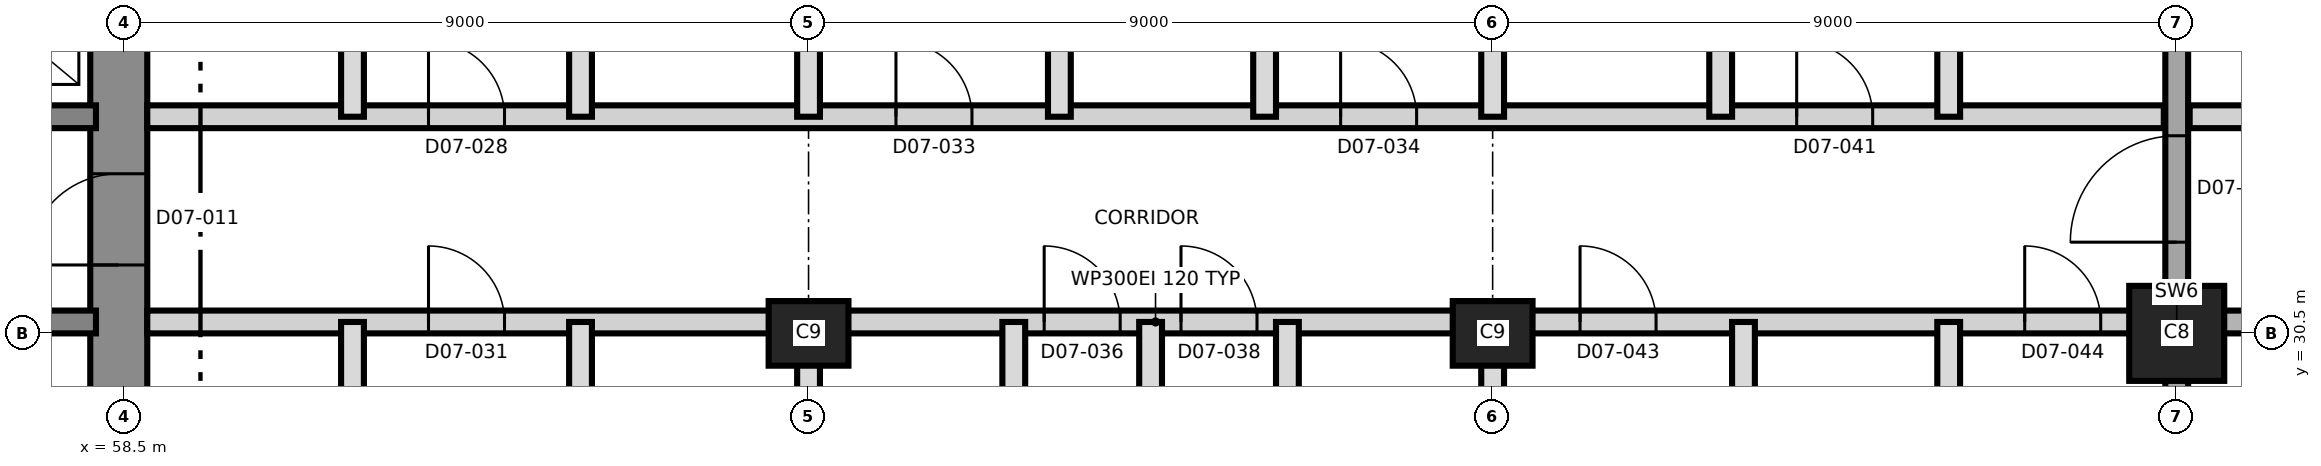
"""IFC4 building model, lengths in metres.
Left out: names, types, materials, properties, quantities, classifications, styles, units other than length and angle.
Written with IfcOpenShell. Run it as: python <this file> out.ifc"""

import sys

from ifc_helpers import new_model, si_unit, direction, frame, frame_2d, origin, origin_2d, place, context, subcontext, project, spatial, rectangle, extrude, element, fill, save


model = new_model("IFC4")
c1 = context("Model", 3, precision=1e-05, world=origin(), true_north=direction((0.0, 1.0)))
c2 = subcontext(c1, "Body", "Model", "MODEL_VIEW")
j1 = project(units=[si_unit("LENGTHUNIT", "METRE"), si_unit("PLANEANGLEUNIT", "RADIAN")], contexts=[c1])
p1 = place(None, origin())
s1 = spatial("IfcSite", under=j1, at=p1, CompositionType="ELEMENT")
p2 = place(p1, origin())
s2 = spatial("IfcBuilding", under=s1, at=p2, CompositionType="ELEMENT")
p3 = place(p2, frame((0.0, 0.0, 87.1)))
s3 = spatial("IfcBuildingStorey", under=s2, at=p3, CompositionType="ELEMENT", Elevation=87.1)
p4 = place(p3, frame((58.425, 21.125, 0.0), z_axis=(0.0, 0.0, 1.0), x_axis=(0.0, 1.0, 0.0)))
e1 = element("IfcWall", 1, at=p4, inside=s3, PredefinedType="SHEAR", context=c2, shape_type="SweptSolid", body=[
    extrude(rectangle(XDim=18.75, YDim=0.75, at=frame_2d((9.375, 0.0))), origin(), (0.0, 0.0, 1.0), 3.7),
])
p5 = place(p4, frame((10.275, 0.0, 0.0)))
e2 = element("IfcOpeningElement", 2, at=p5, cuts=e1, PredefinedType="OPENING", context=c2, shape_type="SweptSolid", body=[
    extrude(rectangle(XDim=1.2, YDim=2.1, at=frame_2d((0.6, 1.05))), frame((0.0, 0.385, 0.0), z_axis=(0.0, -1.0, 0.0), x_axis=(1.0, 0.0, 0.0)), (0.0, 0.0, 1.0), 0.77),
])
p6 = place(p3, frame((31.875, 30.65, 0.0), z_axis=(0.0, 0.0, 1.0), x_axis=(1.0, 0.0, 0.0)))
e3 = element("IfcWall", 3, at=p6, inside=s3, PredefinedType="SHEAR", context=c2, shape_type="SweptSolid", body=[
    extrude(rectangle(XDim=26.25, YDim=0.3, at=frame_2d((13.125, 0.0))), origin(), (0.0, 0.0, 1.0), 3.7),
])
p7 = place(p6, frame((24.625, 0.0, 0.0)))
e4 = element("IfcOpeningElement", 4, at=p7, cuts=e3, PredefinedType="OPENING", context=c2, shape_type="SweptSolid", body=[
    extrude(rectangle(XDim=1.0, YDim=2.1, at=frame_2d((0.5, 1.05))), frame((0.0, 0.16, 0.0), z_axis=(0.0, -1.0, 0.0), x_axis=(1.0, 0.0, 0.0)), (0.0, 0.0, 1.0), 0.32),
])
p8 = place(p6, frame((11.425, 0.0, 0.0)))
e5 = element("IfcOpeningElement", 5, at=p8, cuts=e3, PredefinedType="OPENING", context=c2, shape_type="SweptSolid", body=[
    extrude(rectangle(XDim=1.0, YDim=2.1, at=frame_2d((0.5, 1.05))), frame((0.0, 0.16, 0.0), z_axis=(0.0, -1.0, 0.0), x_axis=(1.0, 0.0, 0.0)), (0.0, 0.0, 1.0), 0.32),
])
p9 = place(p3, frame((31.875, 33.35, 0.0), z_axis=(0.0, 0.0, 1.0), x_axis=(1.0, 0.0, 0.0)))
e6 = element("IfcWall", 6, at=p9, inside=s3, PredefinedType="SHEAR", context=c2, shape_type="SweptSolid", body=[
    extrude(rectangle(XDim=26.25, YDim=0.3, at=frame_2d((13.125, 0.0))), origin(), (0.0, 0.0, 1.0), 3.7),
])
p10 = place(p9, frame((13.775, 0.0, 0.0)))
e7 = element("IfcOpeningElement", 7, at=p10, cuts=e6, PredefinedType="OPENING", context=c2, shape_type="SweptSolid", body=[
    extrude(rectangle(XDim=1.4, YDim=2.1, at=frame_2d((0.7, 1.05))), frame((0.0, 0.16, 0.0), z_axis=(0.0, -1.0, 0.0), x_axis=(1.0, 0.0, 0.0)), (0.0, 0.0, 1.0), 0.32),
])
p11 = place(p9, frame((5.25, 0.0, 0.0)))
e8 = element("IfcOpeningElement", 8, at=p11, cuts=e6, PredefinedType="OPENING", context=c2, shape_type="SweptSolid", body=[
    extrude(rectangle(XDim=1.2, YDim=2.1, at=frame_2d((0.6, 1.05))), frame((0.0, 0.16, 0.0), z_axis=(0.0, -1.0, 0.0), x_axis=(1.0, 0.0, 0.0)), (0.0, 0.0, 1.0), 0.32),
])
p12 = place(p9, frame((19.8, 0.0, 0.0)))
e9 = element("IfcOpeningElement", 9, at=p12, cuts=e6, PredefinedType="OPENING", context=c2, shape_type="SweptSolid", body=[
    extrude(rectangle(XDim=1.2, YDim=2.1, at=frame_2d((0.6, 1.05))), frame((0.0, 0.16, 0.0), z_axis=(0.0, -1.0, 0.0), x_axis=(1.0, 0.0, 0.0)), (0.0, 0.0, 1.0), 0.32),
])
for number, where, z_axis, x_axis in (
    (10, (67.5, 30.5, 0.0), (0.0, 0.0, 1.0), (1.0, 0.0, 0.0)),
    (11, (76.5, 30.5, 0.0), (0.0, 0.0, 1.0), (1.0, 0.0, 0.0)),
):
    element("IfcColumn", number, at=place(p3, frame(where, z_axis=z_axis, x_axis=x_axis)), inside=s3, PredefinedType="COLUMN", context=c2, shape_type="SweptSolid", body=[
        extrude(rectangle(XDim=1.05, YDim=0.85, at=origin_2d()), origin(), (0.0, 0.0, 1.0), 3.7),
    ])
p13 = place(p3, frame((85.5, 30.5, 0.0), z_axis=(0.0, 0.0, 1.0), x_axis=(1.0, 0.0, 0.0)))
e12 = element("IfcColumn", 12, at=p13, inside=s3, PredefinedType="COLUMN", context=c2, shape_type="SweptSolid", body=[
    extrude(rectangle(XDim=1.25, YDim=1.25, at=origin_2d()), origin(), (0.0, 0.0, 1.0), 3.7),
])
p14 = place(p3, frame((85.5, 20.995, 0.0), z_axis=(0.0, 0.0, 1.0), x_axis=(0.0, 1.0, 0.0)))
e13 = element("IfcWall", 13, at=p14, inside=s3, PredefinedType="SHEAR", context=c2, shape_type="SweptSolid", body=[
    extrude(rectangle(XDim=19.01, YDim=0.3, at=frame_2d((9.505, 0.0))), origin(), (0.0, 0.0, 1.0), 3.7),
])
p15 = place(p14, frame((10.705, 0.0, 0.0)))
e14 = element("IfcOpeningElement", 14, at=p15, cuts=e13, PredefinedType="OPENING", context=c2, shape_type="SweptSolid", body=[
    extrude(rectangle(XDim=1.4, YDim=2.1, at=frame_2d((0.7, 1.05))), frame((0.0, 0.16, 0.0), z_axis=(0.0, -1.0, 0.0), x_axis=(1.0, 0.0, 0.0)), (0.0, 0.0, 1.0), 0.32),
])
p16 = place(p3, frame((58.8, 30.65, 0.0), z_axis=(0.0, 0.0, 1.0), x_axis=(1.0, 0.0, 0.0)))
e15 = element("IfcWall", 15, at=p16, inside=s3, PredefinedType="PARTITIONING", context=c2, shape_type="SweptSolid", body=[
    extrude(rectangle(XDim=26.53, YDim=0.3, at=frame_2d((13.265, 0.0))), origin(), (0.0, 0.0, 1.0), 3.4),
])
p17 = place(p16, frame((3.7, 0.0, 0.0)))
e16 = element("IfcOpeningElement", 16, at=p17, cuts=e15, PredefinedType="OPENING", context=c2, shape_type="SweptSolid", body=[
    extrude(rectangle(XDim=1.0, YDim=2.4, at=frame_2d((0.5, 1.2))), frame((0.0, 0.16, 0.0), z_axis=(0.0, -1.0, 0.0), x_axis=(1.0, 0.0, 0.0)), (0.0, 0.0, 1.0), 0.32),
])
p18 = place(p16, frame((11.8, 0.0, 0.0)))
e17 = element("IfcOpeningElement", 17, at=p18, cuts=e15, PredefinedType="OPENING", context=c2, shape_type="SweptSolid", body=[
    extrude(rectangle(XDim=1.0, YDim=2.1, at=frame_2d((0.5, 1.05))), frame((0.0, 0.16, 0.0), z_axis=(0.0, -1.0, 0.0), x_axis=(1.0, 0.0, 0.0)), (0.0, 0.0, 1.0), 0.32),
])
p19 = place(p16, frame((13.6, 0.0, 0.0)))
e18 = element("IfcOpeningElement", 18, at=p19, cuts=e15, PredefinedType="OPENING", context=c2, shape_type="SweptSolid", body=[
    extrude(rectangle(XDim=1.0, YDim=2.1, at=frame_2d((0.5, 1.05))), frame((0.0, 0.16, 0.0), z_axis=(0.0, -1.0, 0.0), x_axis=(1.0, 0.0, 0.0)), (0.0, 0.0, 1.0), 0.32),
])
p20 = place(p16, frame((18.85, 0.0, 0.0)))
e19 = element("IfcOpeningElement", 19, at=p20, cuts=e15, PredefinedType="OPENING", context=c2, shape_type="SweptSolid", body=[
    extrude(rectangle(XDim=1.0, YDim=2.1, at=frame_2d((0.5, 1.05))), frame((0.0, 0.16, 0.0), z_axis=(0.0, -1.0, 0.0), x_axis=(1.0, 0.0, 0.0)), (0.0, 0.0, 1.0), 0.32),
])
p21 = place(p16, frame((24.7, 0.0, 0.0)))
e20 = element("IfcOpeningElement", 20, at=p21, cuts=e15, PredefinedType="OPENING", context=c2, shape_type="SweptSolid", body=[
    extrude(rectangle(XDim=1.0, YDim=2.1, at=frame_2d((0.5, 1.05))), frame((0.0, 0.16, 0.0), z_axis=(0.0, -1.0, 0.0), x_axis=(1.0, 0.0, 0.0)), (0.0, 0.0, 1.0), 0.32),
])
p22 = place(p3, frame((85.67, 30.65, 0.0), z_axis=(0.0, 0.0, 1.0), x_axis=(1.0, 0.0, 0.0)))
e21 = element("IfcWall", 21, at=p22, inside=s3, PredefinedType="SHEAR", context=c2, shape_type="SweptSolid", body=[
    extrude(rectangle(XDim=9.335, YDim=0.3, at=frame_2d((4.667, 0.0))), origin(), (0.0, 0.0, 1.0), 3.4),
])
p23 = place(p22, frame((2.08, 0.0, 0.0)))
e22 = element("IfcOpeningElement", 22, at=p23, cuts=e21, PredefinedType="OPENING", context=c2, shape_type="SweptSolid", body=[
    extrude(rectangle(XDim=1.2, YDim=2.1, at=frame_2d((0.6, 1.05))), frame((0.0, 0.16, 0.0), z_axis=(0.0, -1.0, 0.0), x_axis=(1.0, 0.0, 0.0)), (0.0, 0.0, 1.0), 0.32),
])
p24 = place(p22, frame((5.63, 0.0, 0.0)))
e23 = element("IfcOpeningElement", 23, at=p24, cuts=e21, PredefinedType="OPENING", context=c2, shape_type="SweptSolid", body=[
    extrude(rectangle(XDim=1.0, YDim=2.1, at=frame_2d((0.5, 1.05))), frame((0.0, 0.16, 0.0), z_axis=(0.0, -1.0, 0.0), x_axis=(1.0, 0.0, 0.0)), (0.0, 0.0, 1.0), 0.32),
])
p25 = place(p3, frame((58.8, 33.35, 0.0), z_axis=(0.0, 0.0, 1.0), x_axis=(1.0, 0.0, 0.0)))
e24 = element("IfcWall", 24, at=p25, inside=s3, PredefinedType="PARTITIONING", context=c2, shape_type="SweptSolid", body=[
    extrude(rectangle(XDim=26.53, YDim=0.3, at=frame_2d((13.265, 0.0))), origin(), (0.0, 0.0, 1.0), 3.4),
])
p26 = place(p25, frame((3.7, 0.0, 0.0)))
e25 = element("IfcOpeningElement", 25, at=p26, cuts=e24, PredefinedType="OPENING", context=c2, shape_type="SweptSolid", body=[
    extrude(rectangle(XDim=1.0, YDim=2.4, at=frame_2d((0.5, 1.2))), frame((0.0, 0.16, 0.0), z_axis=(0.0, -1.0, 0.0), x_axis=(1.0, 0.0, 0.0)), (0.0, 0.0, 1.0), 0.32),
])
p27 = place(p25, frame((9.85, 0.0, 0.0)))
e26 = element("IfcOpeningElement", 26, at=p27, cuts=e24, PredefinedType="OPENING", context=c2, shape_type="SweptSolid", body=[
    extrude(rectangle(XDim=1.0, YDim=2.1, at=frame_2d((0.5, 1.05))), frame((0.0, 0.16, 0.0), z_axis=(0.0, -1.0, 0.0), x_axis=(1.0, 0.0, 0.0)), (0.0, 0.0, 1.0), 0.32),
])
p28 = place(p25, frame((15.7, 0.0, 0.0)))
e27 = element("IfcOpeningElement", 27, at=p28, cuts=e24, PredefinedType="OPENING", context=c2, shape_type="SweptSolid", body=[
    extrude(rectangle(XDim=1.0, YDim=2.1, at=frame_2d((0.5, 1.05))), frame((0.0, 0.16, 0.0), z_axis=(0.0, -1.0, 0.0), x_axis=(1.0, 0.0, 0.0)), (0.0, 0.0, 1.0), 0.32),
])
p29 = place(p25, frame((21.7, 0.0, 0.0)))
e28 = element("IfcOpeningElement", 28, at=p29, cuts=e24, PredefinedType="OPENING", context=c2, shape_type="SweptSolid", body=[
    extrude(rectangle(XDim=1.0, YDim=2.4, at=frame_2d((0.5, 1.2))), frame((0.0, 0.16, 0.0), z_axis=(0.0, -1.0, 0.0), x_axis=(1.0, 0.0, 0.0)), (0.0, 0.0, 1.0), 0.32),
])
p30 = place(p3, frame((85.67, 33.35, 0.0), z_axis=(0.0, 0.0, 1.0), x_axis=(1.0, 0.0, 0.0)))
e29 = element("IfcWall", 29, at=p30, inside=s3, PredefinedType="PARTITIONING", context=c2, shape_type="SweptSolid", body=[
    extrude(rectangle(XDim=9.237, YDim=0.3, at=frame_2d((4.619, 0.0))), origin(), (0.0, 0.0, 1.0), 3.4),
])
p31 = place(p30, frame((1.83, 0.0, 0.0)))
e30 = element("IfcOpeningElement", 30, at=p31, cuts=e29, PredefinedType="OPENING", context=c2, shape_type="SweptSolid", body=[
    extrude(rectangle(XDim=1.0, YDim=2.1, at=frame_2d((0.5, 1.05))), frame((0.0, 0.16, 0.0), z_axis=(0.0, -1.0, 0.0), x_axis=(1.0, 0.0, 0.0)), (0.0, 0.0, 1.0), 0.32),
])
p32 = place(p30, frame((5.63, 0.0, 0.0)))
e31 = element("IfcOpeningElement", 31, at=p32, cuts=e29, PredefinedType="OPENING", context=c2, shape_type="SweptSolid", body=[
    extrude(rectangle(XDim=1.0, YDim=2.1, at=frame_2d((0.5, 1.05))), frame((0.0, 0.16, 0.0), z_axis=(0.0, -1.0, 0.0), x_axis=(1.0, 0.0, 0.0)), (0.0, 0.0, 1.0), 0.32),
])
for number, where, z_axis, x_axis in (
    (32, (61.5, 27.35, 0.0), (0.0, 0.0, 1.0), (0.0, 1.0, 0.0)),
    (33, (61.5, 33.35, 0.0), (0.0, 0.0, 1.0), (0.0, 1.0, 0.0)),
    (34, (64.5, 27.35, 0.0), (0.0, 0.0, 1.0), (0.0, 1.0, 0.0)),
    (35, (64.5, 33.35, 0.0), (0.0, 0.0, 1.0), (0.0, 1.0, 0.0)),
):
    element("IfcWall", number, at=place(p3, frame(where, z_axis=z_axis, x_axis=x_axis)), inside=s3, PredefinedType="PARTITIONING", context=c2, shape_type="SweptSolid", body=[
        extrude(rectangle(XDim=3.3, YDim=0.3, at=frame_2d((1.65, 0.0))), origin(), (0.0, 0.0, 1.0), 3.4),
    ])
p33 = place(p3, frame((67.5, 20.995, 0.0), z_axis=(0.0, 0.0, 1.0), x_axis=(0.0, 1.0, 0.0)))
e36 = element("IfcWall", 36, at=p33, inside=s3, PredefinedType="PARTITIONING", context=c2, shape_type="SweptSolid", body=[
    extrude(rectangle(XDim=9.655, YDim=0.3, at=frame_2d((4.827, 0.0))), origin(), (0.0, 0.0, 1.0), 3.4),
])
p34 = place(p3, frame((67.5, 33.35, 0.0), z_axis=(0.0, 0.0, 1.0), x_axis=(0.0, 1.0, 0.0)))
e37 = element("IfcWall", 37, at=p34, inside=s3, PredefinedType="PARTITIONING", context=c2, shape_type="SweptSolid", body=[
    extrude(rectangle(XDim=6.655, YDim=0.3, at=frame_2d((3.327, 0.0))), origin(), (0.0, 0.0, 1.0), 3.4),
])
for number, where, z_axis, x_axis in (
    (38, (70.2, 27.45, 0.0), (0.0, 0.0, 1.0), (0.0, 1.0, 0.0)),
    (39, (70.8, 33.35, 0.0), (0.0, 0.0, 1.0), (0.0, 1.0, 0.0)),
):
    element("IfcWall", number, at=place(p3, frame(where, z_axis=z_axis, x_axis=x_axis)), inside=s3, PredefinedType="PARTITIONING", context=c2, shape_type="SweptSolid", body=[
        extrude(rectangle(XDim=3.2, YDim=0.3, at=frame_2d((1.6, 0.0))), origin(), (0.0, 0.0, 1.0), 3.4),
    ])
p35 = place(p3, frame((72.0, 20.995, 0.0), z_axis=(0.0, 0.0, 1.0), x_axis=(0.0, 1.0, 0.0)))
e40 = element("IfcWall", 40, at=p35, inside=s3, PredefinedType="PARTITIONING", context=c2, shape_type="SweptSolid", body=[
    extrude(rectangle(XDim=9.655, YDim=0.3, at=frame_2d((4.827, 0.0))), origin(), (0.0, 0.0, 1.0), 3.4),
])
p36 = place(p3, frame((73.5, 33.35, 0.0), z_axis=(0.0, 0.0, 1.0), x_axis=(0.0, 1.0, 0.0)))
e41 = element("IfcWall", 41, at=p36, inside=s3, PredefinedType="PARTITIONING", context=c2, shape_type="SweptSolid", body=[
    extrude(rectangle(XDim=6.835, YDim=0.3, at=frame_2d((3.417, 0.0))), origin(), (0.0, 0.0, 1.0), 3.4),
])
p37 = place(p3, frame((73.8, 27.45, 0.0), z_axis=(0.0, 0.0, 1.0), x_axis=(0.0, 1.0, 0.0)))
e42 = element("IfcWall", 42, at=p37, inside=s3, PredefinedType="PARTITIONING", context=c2, shape_type="SweptSolid", body=[
    extrude(rectangle(XDim=3.2, YDim=0.3, at=frame_2d((1.6, 0.0))), origin(), (0.0, 0.0, 1.0), 3.4),
])
p38 = place(p3, frame((76.5, 20.995, 0.0), z_axis=(0.0, 0.0, 1.0), x_axis=(0.0, 1.0, 0.0)))
e43 = element("IfcWall", 43, at=p38, inside=s3, PredefinedType="PARTITIONING", context=c2, shape_type="SweptSolid", body=[
    extrude(rectangle(XDim=9.655, YDim=0.3, at=frame_2d((4.827, 0.0))), origin(), (0.0, 0.0, 1.0), 3.4),
])
p39 = place(p3, frame((76.5, 33.35, 0.0), z_axis=(0.0, 0.0, 1.0), x_axis=(0.0, 1.0, 0.0)))
e44 = element("IfcWall", 44, at=p39, inside=s3, PredefinedType="PARTITIONING", context=c2, shape_type="SweptSolid", body=[
    extrude(rectangle(XDim=6.655, YDim=0.3, at=frame_2d((3.327, 0.0))), origin(), (0.0, 0.0, 1.0), 3.4),
])
p40 = place(p3, frame((79.5, 33.35, 0.0), z_axis=(0.0, 0.0, 1.0), x_axis=(0.0, 1.0, 0.0)))
e45 = element("IfcWall", 45, at=p40, inside=s3, PredefinedType="PARTITIONING", context=c2, shape_type="SweptSolid", body=[
    extrude(rectangle(XDim=3.3, YDim=0.3, at=frame_2d((1.65, 0.0))), origin(), (0.0, 0.0, 1.0), 3.4),
])
p41 = place(p3, frame((79.8, 27.45, 0.0), z_axis=(0.0, 0.0, 1.0), x_axis=(0.0, 1.0, 0.0)))
e46 = element("IfcWall", 46, at=p41, inside=s3, PredefinedType="PARTITIONING", context=c2, shape_type="SweptSolid", body=[
    extrude(rectangle(XDim=3.2, YDim=0.3, at=frame_2d((1.6, 0.0))), origin(), (0.0, 0.0, 1.0), 3.4),
])
p42 = place(p3, frame((82.5, 20.995, 0.0), z_axis=(0.0, 0.0, 1.0), x_axis=(0.0, 1.0, 0.0)))
e47 = element("IfcWall", 47, at=p42, inside=s3, PredefinedType="PARTITIONING", context=c2, shape_type="SweptSolid", body=[
    extrude(rectangle(XDim=9.655, YDim=0.3, at=frame_2d((4.827, 0.0))), origin(), (0.0, 0.0, 1.0), 3.4),
])
p43 = place(p3, frame((82.5, 33.35, 0.0), z_axis=(0.0, 0.0, 1.0), x_axis=(0.0, 1.0, 0.0)))
e48 = element("IfcWall", 48, at=p43, inside=s3, PredefinedType="PARTITIONING", context=c2, shape_type="SweptSolid", body=[
    extrude(rectangle(XDim=3.3, YDim=0.3, at=frame_2d((1.65, 0.0))), origin(), (0.0, 0.0, 1.0), 3.4),
])
p44 = place(p5, origin())
e49 = element("IfcDoor", 49, at=p44, inside=s3, OperationType="SINGLE_SWING_LEFT", PredefinedType="DOOR", context=c2, shape_type="SweptSolid", body=[
    extrude(rectangle(XDim=1.2, YDim=2.1, at=frame_2d((0.6, 1.05))), frame((0.0, 0.025, 0.0), z_axis=(0.0, -1.0, 0.0), x_axis=(1.0, 0.0, 0.0)), (0.0, 0.0, 1.0), 0.05),
])
fill(e2, e49)
p45 = place(p26, origin())
e50 = element("IfcDoor", 50, at=p45, inside=s3, OperationType="SINGLE_SWING_LEFT", PredefinedType="DOOR", context=c2, shape_type="SweptSolid", body=[
    extrude(rectangle(XDim=1.0, YDim=2.4, at=frame_2d((0.5, 1.2))), frame((0.0, 0.025, 0.0), z_axis=(0.0, -1.0, 0.0), x_axis=(1.0, 0.0, 0.0)), (0.0, 0.0, 1.0), 0.05),
])
fill(e25, e50)
p46 = place(p17, origin())
e51 = element("IfcDoor", 51, at=p46, inside=s3, OperationType="SINGLE_SWING_LEFT", PredefinedType="DOOR", context=c2, shape_type="SweptSolid", body=[
    extrude(rectangle(XDim=1.0, YDim=2.4, at=frame_2d((0.5, 1.2))), frame((0.0, 0.025, 0.0), z_axis=(0.0, -1.0, 0.0), x_axis=(1.0, 0.0, 0.0)), (0.0, 0.0, 1.0), 0.05),
])
fill(e16, e51)
p47 = place(p27, origin())
e52 = element("IfcDoor", 52, at=p47, inside=s3, OperationType="SINGLE_SWING_LEFT", PredefinedType="DOOR", context=c2, shape_type="SweptSolid", body=[
    extrude(rectangle(XDim=1.0, YDim=2.1, at=frame_2d((0.5, 1.05))), frame((0.0, 0.025, 0.0), z_axis=(0.0, -1.0, 0.0), x_axis=(1.0, 0.0, 0.0)), (0.0, 0.0, 1.0), 0.05),
])
fill(e26, e52)
p48 = place(p28, origin())
e53 = element("IfcDoor", 53, at=p48, inside=s3, OperationType="SINGLE_SWING_RIGHT", PredefinedType="DOOR", context=c2, shape_type="SweptSolid", body=[
    extrude(rectangle(XDim=1.0, YDim=2.1, at=frame_2d((0.5, 1.05))), frame((0.0, 0.025, 0.0), z_axis=(0.0, -1.0, 0.0), x_axis=(1.0, 0.0, 0.0)), (0.0, 0.0, 1.0), 0.05),
])
fill(e27, e53)
p49 = place(p18, origin())
e54 = element("IfcDoor", 54, at=p49, inside=s3, OperationType="SINGLE_SWING_LEFT", PredefinedType="DOOR", context=c2, shape_type="SweptSolid", body=[
    extrude(rectangle(XDim=1.0, YDim=2.1, at=frame_2d((0.5, 1.05))), frame((0.0, 0.025, 0.0), z_axis=(0.0, -1.0, 0.0), x_axis=(1.0, 0.0, 0.0)), (0.0, 0.0, 1.0), 0.05),
])
fill(e17, e54)
p50 = place(p19, origin())
e55 = element("IfcDoor", 55, at=p50, inside=s3, OperationType="SINGLE_SWING_RIGHT", PredefinedType="DOOR", context=c2, shape_type="SweptSolid", body=[
    extrude(rectangle(XDim=1.0, YDim=2.1, at=frame_2d((0.5, 1.05))), frame((0.0, 0.025, 0.0), z_axis=(0.0, -1.0, 0.0), x_axis=(1.0, 0.0, 0.0)), (0.0, 0.0, 1.0), 0.05),
])
fill(e18, e55)
p51 = place(p29, origin())
e56 = element("IfcDoor", 56, at=p51, inside=s3, OperationType="SINGLE_SWING_LEFT", PredefinedType="DOOR", context=c2, shape_type="SweptSolid", body=[
    extrude(rectangle(XDim=1.0, YDim=2.4, at=frame_2d((0.5, 1.2))), frame((0.0, 0.025, 0.0), z_axis=(0.0, -1.0, 0.0), x_axis=(1.0, 0.0, 0.0)), (0.0, 0.0, 1.0), 0.05),
])
fill(e28, e56)
p52 = place(p20, origin())
e57 = element("IfcDoor", 57, at=p52, inside=s3, OperationType="SINGLE_SWING_LEFT", PredefinedType="DOOR", context=c2, shape_type="SweptSolid", body=[
    extrude(rectangle(XDim=1.0, YDim=2.1, at=frame_2d((0.5, 1.05))), frame((0.0, 0.025, 0.0), z_axis=(0.0, -1.0, 0.0), x_axis=(1.0, 0.0, 0.0)), (0.0, 0.0, 1.0), 0.05),
])
fill(e19, e57)
p53 = place(p21, origin())
e58 = element("IfcDoor", 58, at=p53, inside=s3, OperationType="SINGLE_SWING_LEFT", PredefinedType="DOOR", context=c2, shape_type="SweptSolid", body=[
    extrude(rectangle(XDim=1.0, YDim=2.1, at=frame_2d((0.5, 1.05))), frame((0.0, 0.025, 0.0), z_axis=(0.0, -1.0, 0.0), x_axis=(1.0, 0.0, 0.0)), (0.0, 0.0, 1.0), 0.05),
])
fill(e20, e58)
p54 = place(p15, origin())
e59 = element("IfcDoor", 59, at=p54, inside=s3, OperationType="SINGLE_SWING_RIGHT", PredefinedType="DOOR", context=c2, shape_type="SweptSolid", body=[
    extrude(rectangle(XDim=1.4, YDim=2.1, at=frame_2d((0.7, 1.05))), frame((0.0, 0.025, 0.0), z_axis=(0.0, -1.0, 0.0), x_axis=(1.0, 0.0, 0.0)), (0.0, 0.0, 1.0), 0.05),
])
fill(e14, e59)
save(model, sys.argv[1])
